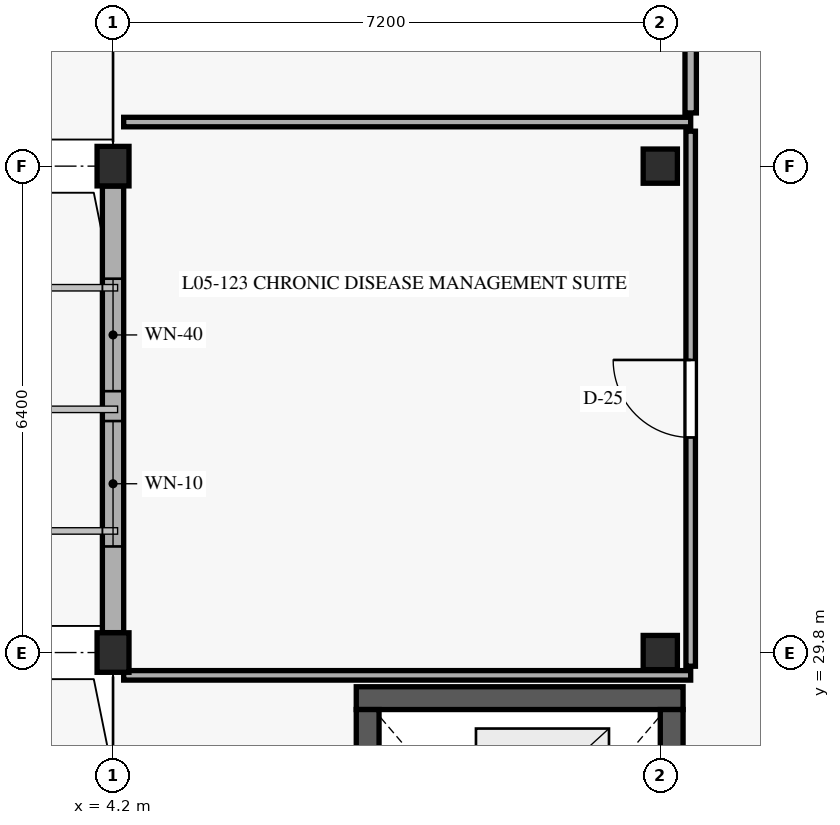
"""IFC4 building model, lengths in metres.
Left out: names, types, materials, properties, quantities, classifications, styles, units other than length and angle.
Written with IfcOpenShell. Run it as: python <this file> out.ifc"""

import sys

from ifc_helpers import new_model, si_unit, direction, frame, frame_2d, origin, origin_with_axes, origin_2d, place, context, subcontext, project, spatial, rectangle, extrude, element, fill, save


model = new_model("IFC4")
c1 = context("Model", 3, precision=1e-05, world=origin(), true_north=direction((0.0, 1.0)))
c2 = subcontext(c1, "Body", "Model", "MODEL_VIEW")
j1 = project(units=[si_unit("LENGTHUNIT", "METRE"), si_unit("PLANEANGLEUNIT", "RADIAN")], contexts=[c1])
p1 = place(None, origin())
s1 = spatial("IfcSite", under=j1, at=p1, CompositionType="ELEMENT")
p2 = place(p1, origin())
s2 = spatial("IfcBuilding", under=s1, at=p2, CompositionType="ELEMENT")
p3 = place(p2, frame((0.0, 0.0, 17.55)))
s3 = spatial("IfcBuildingStorey", under=s2, at=p3, CompositionType="ELEMENT", Elevation=17.55)
for number, where, z_axis, x_axis in (
    (1, (4.2, 29.8, 0.0), (0.0, 0.0, 1.0), (1.0, 0.0, 0.0)),
    (2, (4.2, 36.2, 0.0), (0.0, 0.0, 1.0), (1.0, 0.0, 0.0)),
):
    element("IfcColumn", number, at=place(p3, frame(where, z_axis=z_axis, x_axis=x_axis)), inside=s3, PredefinedType="COLUMN", context=c2, shape_type="SweptSolid", body=[
        extrude(rectangle(XDim=0.42, YDim=0.52, at=origin_2d()), origin(), (0.0, 0.0, 1.0), 4.05),
    ])
for number, where, z_axis, x_axis in (
    (3, (11.4, 29.8, 0.0), (0.0, 0.0, 1.0), (1.0, 0.0, 0.0)),
    (4, (11.4, 36.2, 0.0), (0.0, 0.0, 1.0), (1.0, 0.0, 0.0)),
):
    element("IfcColumn", number, at=place(p3, frame(where, z_axis=z_axis, x_axis=x_axis)), inside=s3, PredefinedType="COLUMN", context=c2, shape_type="SweptSolid", body=[
        extrude(rectangle(XDim=0.45, YDim=0.45, at=origin_2d()), origin(), (0.0, 0.0, 1.0), 4.05),
    ])
p4 = place(p3, frame((11.7, 29.2, 0.0), z_axis=(0.0, 0.0, 1.0), x_axis=(-1.0, 0.0, 0.0)))
e5 = element("IfcWall", 5, at=p4, inside=s3, PredefinedType="SHEAR", context=c2, shape_type="SweptSolid", body=[
    extrude(rectangle(XDim=4.3, YDim=0.3, at=frame_2d((2.15, 0.0))), origin(), (0.0, 0.0, 1.0), 3.77),
])
p5 = place(p3, frame((7.55, 29.05, 0.0), z_axis=(0.0, 0.0, 1.0), x_axis=(0.0, -1.0, 0.0)))
e6 = element("IfcWall", 6, at=p5, inside=s3, PredefinedType="SHEAR", context=c2, shape_type="SweptSolid", body=[
    extrude(rectangle(XDim=11.7, YDim=0.3, at=frame_2d((5.85, 0.0))), origin(), (0.0, 0.0, 1.0), 3.77),
])
p6 = place(p3, frame((11.55, 17.35, 0.0), z_axis=(0.0, 0.0, 1.0), x_axis=(0.0, 1.0, 0.0)))
e7 = element("IfcWall", 7, at=p6, inside=s3, PredefinedType="SHEAR", context=c2, shape_type="SweptSolid", body=[
    extrude(rectangle(XDim=11.7, YDim=0.3, at=frame_2d((5.85, 0.0))), origin(), (0.0, 0.0, 1.0), 3.77),
])
p7 = place(p6, frame((0.2, 0.0, 0.0)))
e8 = element("IfcOpeningElement", 8, at=p7, cuts=e7, PredefinedType="OPENING", context=c2, shape_type="SweptSolid", body=[
    extrude(rectangle(XDim=1.1, YDim=2.2, at=frame_2d((0.55, 1.1))), frame((0.0, 0.16, 0.0), z_axis=(0.0, -1.0, 0.0), x_axis=(1.0, 0.0, 0.0)), (0.0, 0.0, 1.0), 0.32),
])
p8 = place(p6, frame((7.875, 0.0, 0.0)))
e9 = element("IfcOpeningElement", 9, at=p8, cuts=e7, PredefinedType="OPENING", context=c2, shape_type="SweptSolid", body=[
    extrude(rectangle(XDim=1.15, YDim=2.2, at=frame_2d((0.575, 1.1))), frame((0.0, 0.16, 0.0), z_axis=(0.0, -1.0, 0.0), x_axis=(1.0, 0.0, 0.0)), (0.0, 0.0, 1.0), 0.32),
])
p9 = place(p6, frame((10.14, 0.0, 0.0)))
e10 = element("IfcOpeningElement", 10, at=p9, cuts=e7, PredefinedType="OPENING", context=c2, shape_type="SweptSolid", body=[
    extrude(rectangle(XDim=1.02, YDim=2.15, at=frame_2d((0.51, 1.075))), frame((0.0, 0.16, 0.0), z_axis=(0.0, -1.0, 0.0), x_axis=(1.0, 0.0, 0.0)), (0.0, 0.0, 1.0), 0.32),
])
p10 = place(p3, frame((4.2, 35.938, 0.0), z_axis=(0.0, 0.0, 1.0), x_axis=(0.0, -1.0, 0.0)))
e11 = element("IfcWall", 11, at=p10, inside=s3, PredefinedType="SOLIDWALL", context=c2, shape_type="SweptSolid", body=[
    extrude(rectangle(XDim=5.876, YDim=0.28, at=frame_2d((2.938, 0.0))), origin(), (0.0, 0.0, 1.0), 3.35),
])
p11 = place(p10, frame((1.219, 0.0, 0.88)))
e12 = element("IfcOpeningElement", 12, at=p11, cuts=e11, PredefinedType="OPENING", context=c2, shape_type="SweptSolid", body=[
    extrude(rectangle(XDim=1.48, YDim=2.15, at=frame_2d((0.74, 1.075))), frame((0.0, 0.15, 0.0), z_axis=(0.0, -1.0, 0.0), x_axis=(1.0, 0.0, 0.0)), (0.0, 0.0, 1.0), 0.3),
])
p12 = place(p10, frame((3.092, 0.0, 0.88)))
e13 = element("IfcOpeningElement", 13, at=p12, cuts=e11, PredefinedType="OPENING", context=c2, shape_type="SweptSolid", body=[
    extrude(rectangle(XDim=1.65, YDim=1.85, at=frame_2d((0.825, 0.925))), frame((0.0, 0.15, 0.0), z_axis=(0.0, -1.0, 0.0), x_axis=(1.0, 0.0, 0.0)), (0.0, 0.0, 1.0), 0.3),
])
p13 = place(p3, frame((11.8, 29.62, 0.0), z_axis=(0.0, 0.0, 1.0), x_axis=(0.0, 1.0, 0.0)))
e14 = element("IfcWall", 14, at=p13, inside=s3, PredefinedType="PARTITIONING", context=c2, shape_type="SweptSolid", body=[
    extrude(rectangle(XDim=7.04, YDim=0.125, at=frame_2d((3.52, 0.0))), origin(), (0.0, 0.0, 1.0), 3.365),
])
p14 = place(p13, frame((3.01, 0.0, 0.0)))
e15 = element("IfcOpeningElement", 15, at=p14, cuts=e14, PredefinedType="OPENING", context=c2, shape_type="SweptSolid", body=[
    extrude(rectangle(XDim=1.02, YDim=2.18, at=frame_2d((0.51, 1.09))), frame((0.0, 0.073, 0.0), z_axis=(0.0, -1.0, 0.0), x_axis=(1.0, 0.0, 0.0)), (0.0, 0.0, 1.0), 0.145),
])
for number, where, z_axis, x_axis in (
    (16, (4.34, 36.78, 0.0), (0.0, 0.0, 1.0), (1.0, 0.0, 0.0)),
    (17, (4.34, 29.5, 0.0), (0.0, 0.0, 1.0), (1.0, 0.0, 0.0)),
):
    element("IfcWall", number, at=place(p3, frame(where, z_axis=z_axis, x_axis=x_axis)), inside=s3, PredefinedType="PARTITIONING", context=c2, shape_type="SweptSolid", body=[
        extrude(rectangle(XDim=7.46, YDim=0.125, at=frame_2d((3.73, 0.0))), origin(), (0.0, 0.0, 1.0), 3.345),
    ])
p15 = place(p3, frame((11.8, 36.9, 0.0), z_axis=(0.0, 0.0, 1.0), x_axis=(0.0, 1.0, 0.0)))
e18 = element("IfcWall", 18, at=p15, inside=s3, PredefinedType="PARTITIONING", context=c2, shape_type="SweptSolid", body=[
    extrude(rectangle(XDim=5.56, YDim=0.15, at=frame_2d((2.78, 0.0))), origin(), (0.0, 0.0, 1.0), 3.765),
])
p16 = place(p15, frame((2.365, 0.0, 0.0)))
e19 = element("IfcOpeningElement", 19, at=p16, cuts=e18, PredefinedType="OPENING", context=c2, shape_type="SweptSolid", body=[
    extrude(rectangle(XDim=0.98, YDim=2.12, at=frame_2d((0.49, 1.06))), frame((0.0, 0.085, 0.0), z_axis=(0.0, -1.0, 0.0), x_axis=(1.0, 0.0, 0.0)), (0.0, 0.0, 1.0), 0.17),
])
p17 = place(p11, origin_with_axes())
e20 = element("IfcWindow", 20, at=p17, inside=s3, PartitioningType="SINGLE_PANEL", PredefinedType="WINDOW", context=c2, shape_type="SweptSolid", body=[
    extrude(rectangle(XDim=1.48, YDim=2.15, at=frame_2d((0.74, 1.075))), frame((0.0, 0.03, 0.0), z_axis=(0.0, -1.0, 0.0), x_axis=(1.0, 0.0, 0.0)), (0.0, 0.0, 1.0), 0.06),
])
fill(e12, e20)
p18 = place(p12, origin_with_axes())
e21 = element("IfcWindow", 21, at=p18, inside=s3, PartitioningType="SINGLE_PANEL", PredefinedType="WINDOW", context=c2, shape_type="SweptSolid", body=[
    extrude(rectangle(XDim=1.65, YDim=1.85, at=frame_2d((0.825, 0.925))), frame((0.0, 0.03, 0.0), z_axis=(0.0, -1.0, 0.0), x_axis=(1.0, 0.0, 0.0)), (0.0, 0.0, 1.0), 0.06),
])
fill(e13, e21)
p19 = place(p14, origin_with_axes())
e22 = element("IfcDoor", 22, at=p19, inside=s3, OperationType="SINGLE_SWING_RIGHT", PredefinedType="DOOR", context=c2, shape_type="SweptSolid", body=[
    extrude(rectangle(XDim=1.02, YDim=2.18, at=frame_2d((0.51, 1.09))), frame((0.0, 0.025, 0.0), z_axis=(0.0, -1.0, 0.0), x_axis=(1.0, 0.0, 0.0)), (0.0, 0.0, 1.0), 0.05),
])
fill(e15, e22)
save(model, sys.argv[1])
